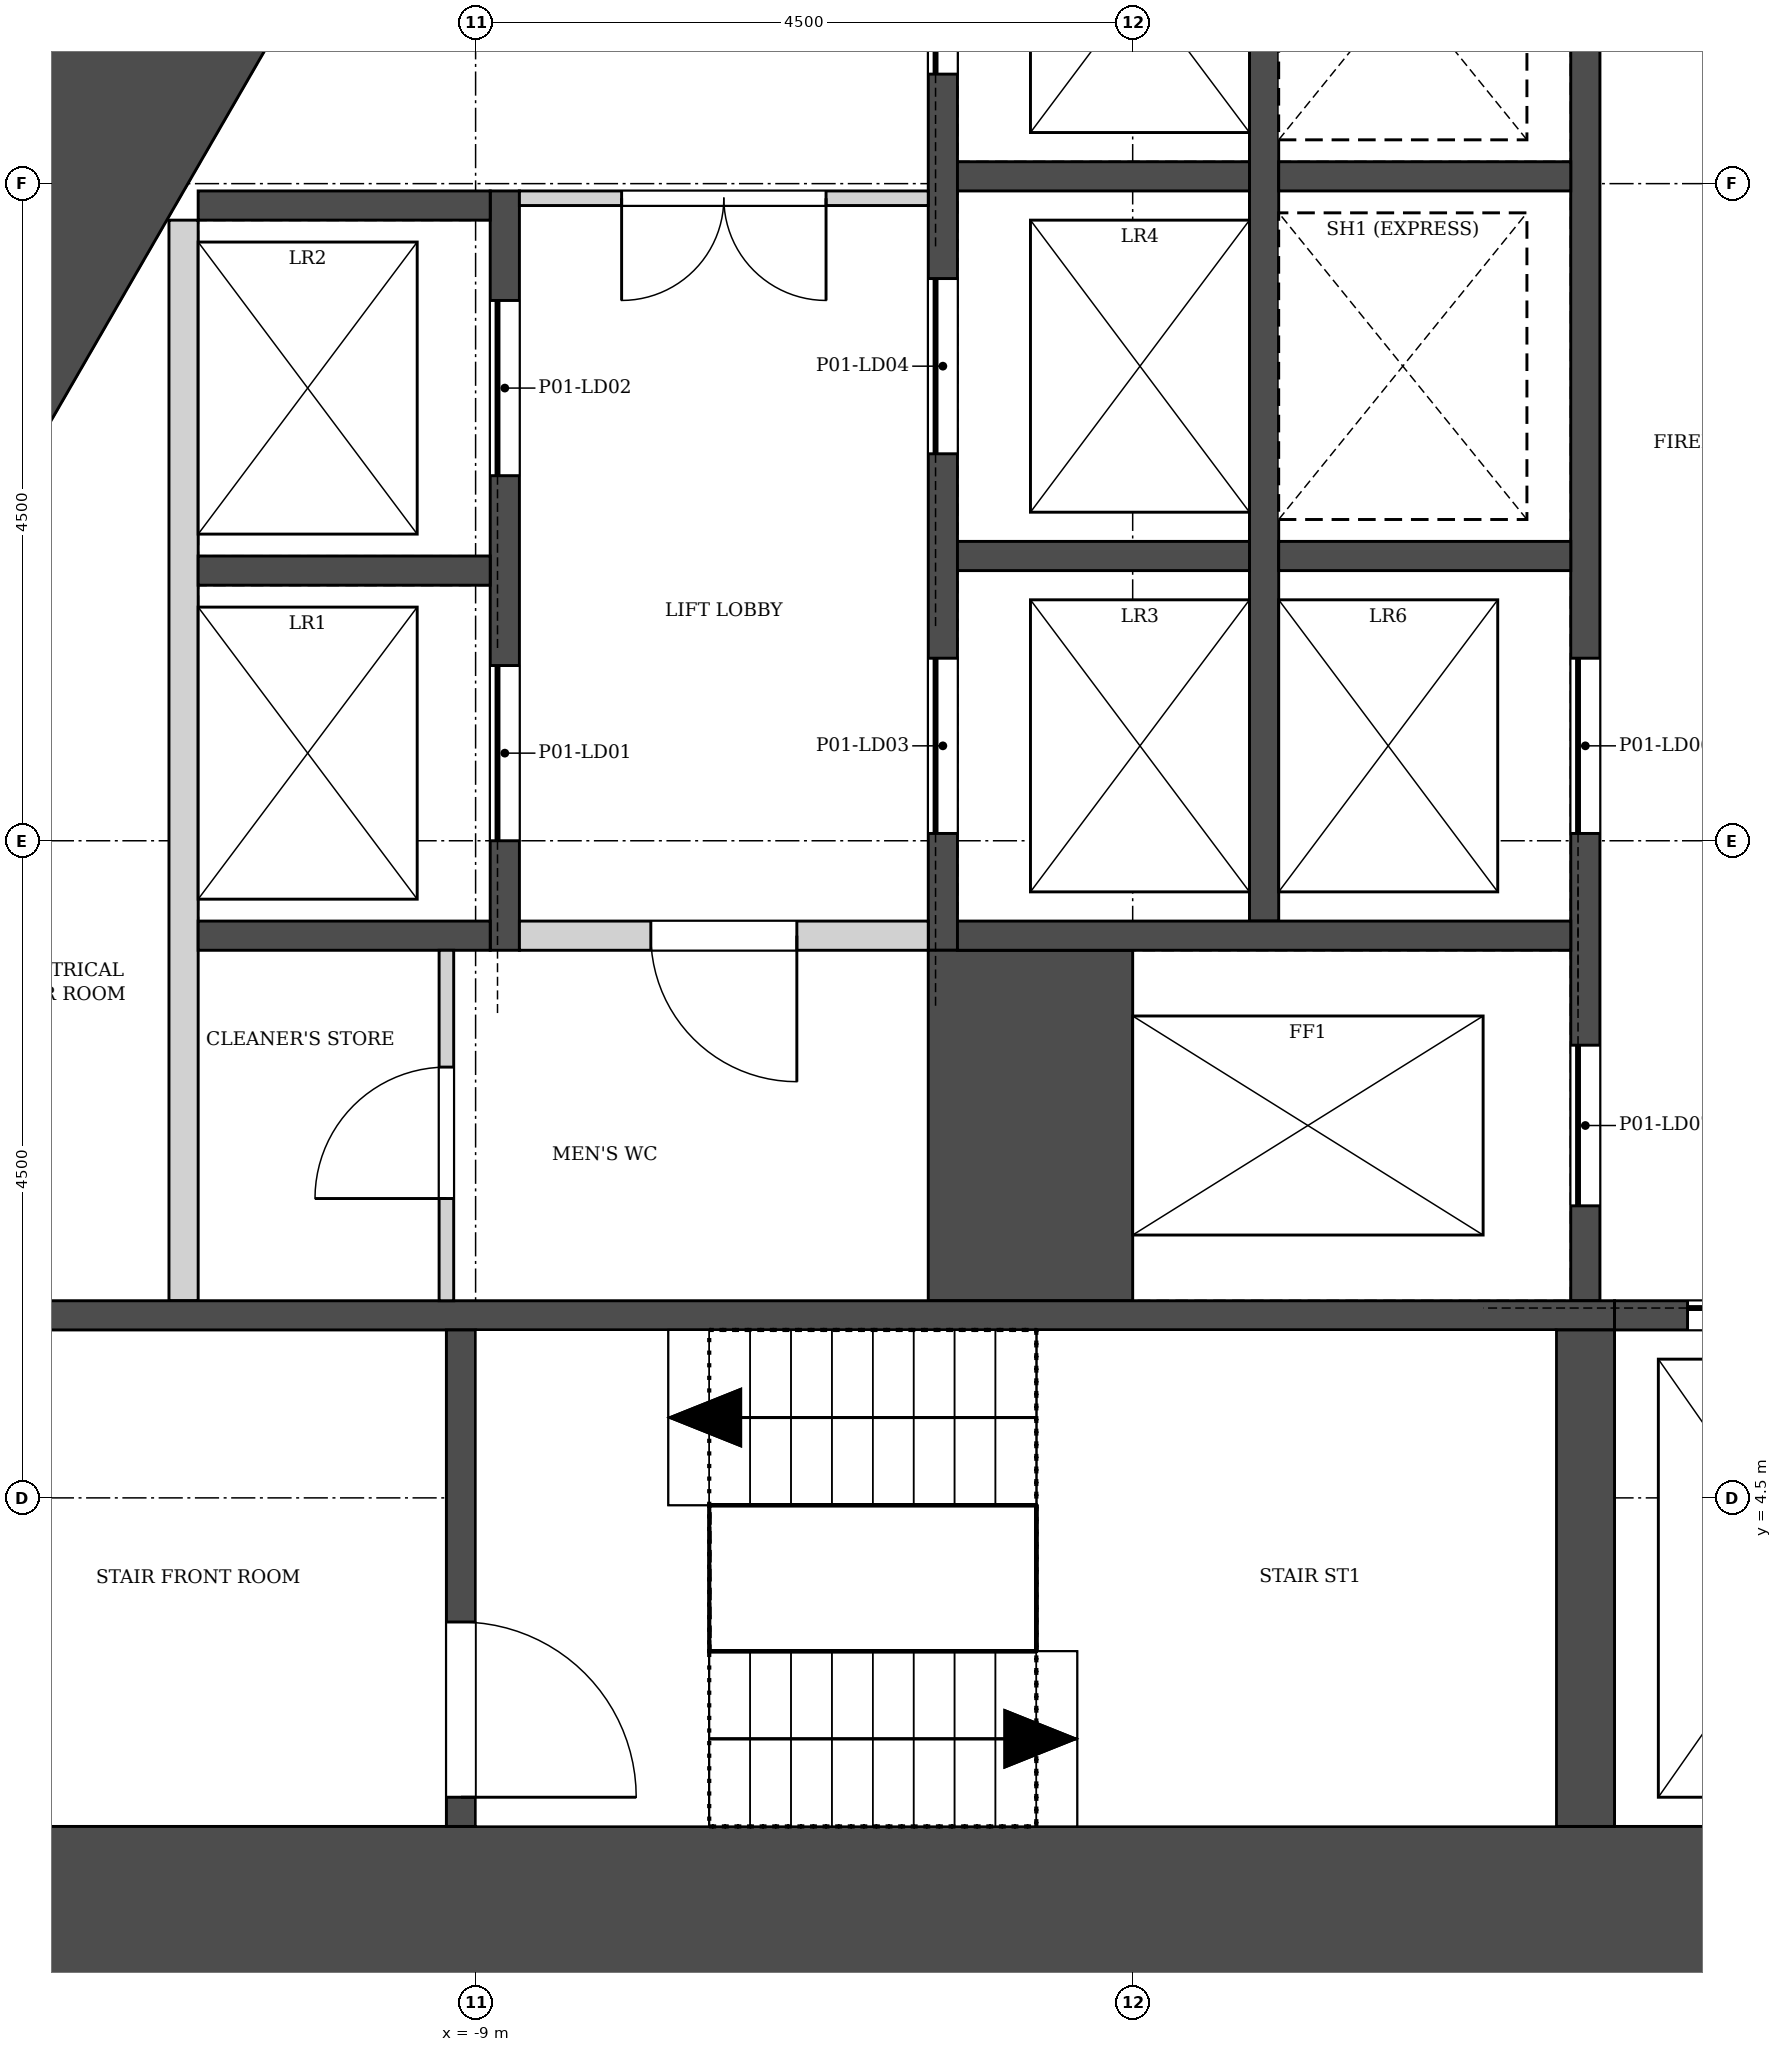
"""IFC4 building model, lengths in metres.
Left out: names, types, materials, properties, quantities, classifications, styles, units other than length and angle.
Written with IfcOpenShell. Run it as: python <this file> out.ifc"""

import sys

from ifc_helpers import new_model, si_unit, direction, frame, frame_2d, origin, place, context, subcontext, project, spatial, rectangle, extrude, element, fill, save


model = new_model("IFC4")
c1 = context("Model", 3, precision=1e-05, world=origin(), true_north=direction((0.0, 1.0)))
c2 = subcontext(c1, "Body", "Model", "MODEL_VIEW")
j1 = project(units=[si_unit("LENGTHUNIT", "METRE"), si_unit("PLANEANGLEUNIT", "RADIAN")], contexts=[c1])
p1 = place(None, origin())
s1 = spatial("IfcSite", under=j1, at=p1, CompositionType="ELEMENT")
p2 = place(p1, origin())
s2 = spatial("IfcBuilding", under=s1, at=p2, CompositionType="ELEMENT")
p3 = place(p2, frame((0.0, 0.0, 8.0)))
s3 = spatial("IfcBuildingStorey", under=s2, at=p3, CompositionType="ELEMENT", Elevation=8.0)
p4 = place(p3, frame((-14.0, 1.55, 0.0), z_axis=(0.0, 0.0, 1.0), x_axis=(1.0, 0.0, 0.0)))
e1 = element("IfcWall", 1, at=p4, inside=s3, PredefinedType="SHEAR", context=c2, shape_type="SweptSolid", body=[
    extrude(rectangle(XDim=28.0, YDim=1.4, at=frame_2d((14.0, 0.0))), origin(), (0.0, 0.0, 1.0), 6.0),
])
p5 = place(p3, frame((-8.805, 18.65, 0.0), z_axis=(0.0, 0.0, 1.0), x_axis=(-0.50000187635, -0.866024320471, 0.0)))
e2 = element("IfcWall", 2, at=p5, inside=s3, PredefinedType="SHEAR", context=c2, shape_type="SweptSolid", body=[
    extrude(rectangle(XDim=9.177, YDim=1.4, at=frame_2d((4.588, 0.0))), origin(), (0.0, 0.0, 1.0), 6.0),
])
p6 = place(p3, frame((-11.0, 5.85, 0.0), z_axis=(0.0, 0.0, 1.0), x_axis=(0.0, 1.0, 0.0)))
e3 = element("IfcWall", 3, at=p6, inside=s3, PredefinedType="SOLIDWALL", context=c2, shape_type="SweptSolid", body=[
    extrude(rectangle(XDim=7.4, YDim=0.2, at=frame_2d((3.7, 0.0))), origin(), (0.0, 0.0, 1.0), 5.7),
])
p7 = place(p3, frame((-8.8, 8.25, -0.3), z_axis=(0.0, 0.0, 1.0), x_axis=(0.0, 1.0, 0.0)))
e4 = element("IfcWall", 4, at=p7, inside=s3, PredefinedType="SOLIDWALL", context=c2, shape_type="SweptSolid", body=[
    extrude(rectangle(XDim=5.2, YDim=0.2, at=frame_2d((2.6, 0.0))), origin(), (0.0, 0.0, 1.0), 6.0),
])
p8 = place(p7, frame((0.75, 0.0, 0.3)))
e5 = element("IfcOpeningElement", 5, at=p8, cuts=e4, PredefinedType="OPENING", context=c2, shape_type="SweptSolid", body=[
    extrude(rectangle(XDim=1.2, YDim=2.1, at=frame_2d((0.6, 1.05))), frame((0.0, 0.11, 0.0), z_axis=(0.0, -1.0, 0.0), x_axis=(1.0, 0.0, 0.0)), (0.0, 0.0, 1.0), 0.22),
])
p9 = place(p7, frame((3.25, 0.0, 0.3)))
e6 = element("IfcOpeningElement", 6, at=p9, cuts=e4, PredefinedType="OPENING", context=c2, shape_type="SweptSolid", body=[
    extrude(rectangle(XDim=1.2, YDim=2.1, at=frame_2d((0.6, 1.05))), frame((0.0, 0.11, 0.0), z_axis=(0.0, -1.0, 0.0), x_axis=(1.0, 0.0, 0.0)), (0.0, 0.0, 1.0), 0.22),
])
p10 = place(p3, frame((-5.8, 8.25, -0.3), z_axis=(0.0, 0.0, 1.0), x_axis=(0.0, 1.0, 0.0)))
e7 = element("IfcWall", 7, at=p10, inside=s3, PredefinedType="SOLIDWALL", context=c2, shape_type="SweptSolid", body=[
    extrude(rectangle(XDim=8.0, YDim=0.2, at=frame_2d((4.0, 0.0))), origin(), (0.0, 0.0, 1.0), 6.0),
])
p11 = place(p10, frame((0.8, 0.0, 0.3)))
e8 = element("IfcOpeningElement", 8, at=p11, cuts=e7, PredefinedType="OPENING", context=c2, shape_type="SweptSolid", body=[
    extrude(rectangle(XDim=1.2, YDim=2.1, at=frame_2d((0.6, 1.05))), frame((0.0, 0.11, 0.0), z_axis=(0.0, -1.0, 0.0), x_axis=(1.0, 0.0, 0.0)), (0.0, 0.0, 1.0), 0.22),
])
p12 = place(p10, frame((3.4, 0.0, 0.3)))
e9 = element("IfcOpeningElement", 9, at=p12, cuts=e7, PredefinedType="OPENING", context=c2, shape_type="SweptSolid", body=[
    extrude(rectangle(XDim=1.2, YDim=2.1, at=frame_2d((0.6, 1.05))), frame((0.0, 0.11, 0.0), z_axis=(0.0, -1.0, 0.0), x_axis=(1.0, 0.0, 0.0)), (0.0, 0.0, 1.0), 0.22),
])
p13 = place(p10, frame((6.0, 0.0, 0.3)))
e10 = element("IfcOpeningElement", 10, at=p13, cuts=e7, PredefinedType="OPENING", context=c2, shape_type="SweptSolid", body=[
    extrude(rectangle(XDim=1.2, YDim=2.1, at=frame_2d((0.6, 1.05))), frame((0.0, 0.11, 0.0), z_axis=(0.0, -1.0, 0.0), x_axis=(1.0, 0.0, 0.0)), (0.0, 0.0, 1.0), 0.22),
])
p14 = place(p3, frame((-3.6, 8.45, -0.3), z_axis=(0.0, 0.0, 1.0), x_axis=(0.0, 1.0, 0.0)))
e11 = element("IfcWall", 11, at=p14, inside=s3, PredefinedType="SOLIDWALL", context=c2, shape_type="SweptSolid", body=[
    extrude(rectangle(XDim=7.8, YDim=0.2, at=frame_2d((3.9, 0.0))), origin(), (0.0, 0.0, 1.0), 6.0),
])
p15 = place(p3, frame((-1.4, 5.85, -0.3), z_axis=(0.0, 0.0, 1.0), x_axis=(0.0, 1.0, 0.0)))
e12 = element("IfcWall", 12, at=p15, inside=s3, PredefinedType="SOLIDWALL", context=c2, shape_type="SweptSolid", body=[
    extrude(rectangle(XDim=11.75, YDim=0.2, at=frame_2d((5.875, 0.0))), origin(), (0.0, 0.0, 1.0), 6.0),
])
p16 = place(p15, frame((3.2, 0.0, 0.3)))
e13 = element("IfcOpeningElement", 13, at=p16, cuts=e12, PredefinedType="OPENING", context=c2, shape_type="SweptSolid", body=[
    extrude(rectangle(XDim=1.2, YDim=2.1, at=frame_2d((0.6, 1.05))), frame((0.0, 0.11, 0.0), z_axis=(0.0, -1.0, 0.0), x_axis=(1.0, 0.0, 0.0)), (0.0, 0.0, 1.0), 0.22),
])
p17 = place(p15, frame((0.65, 0.0, 0.3)))
e14 = element("IfcOpeningElement", 14, at=p17, cuts=e12, PredefinedType="OPENING", context=c2, shape_type="SweptSolid", body=[
    extrude(rectangle(XDim=1.1, YDim=2.1, at=frame_2d((0.55, 1.05))), frame((0.0, 0.11, 0.0), z_axis=(0.0, -1.0, 0.0), x_axis=(1.0, 0.0, 0.0)), (0.0, 0.0, 1.0), 0.22),
])
p18 = place(p3, frame((-5.2, 5.85, -0.3), z_axis=(0.0, 0.0, 1.0), x_axis=(0.0, 1.0, 0.0)))
e15 = element("IfcWall", 15, at=p18, inside=s3, PredefinedType="SOLIDWALL", context=c2, shape_type="SweptSolid", body=[
    extrude(rectangle(XDim=2.4, YDim=1.4, at=frame_2d((1.2, 0.0))), origin(), (0.0, 0.0, 1.0), 6.0),
])
p19 = place(p3, frame((-10.9, 8.35, -0.3), z_axis=(0.0, 0.0, 1.0), x_axis=(1.0, 0.0, 0.0)))
e16 = element("IfcWall", 16, at=p19, inside=s3, PredefinedType="SOLIDWALL", context=c2, shape_type="SweptSolid", body=[
    extrude(rectangle(XDim=2.0, YDim=0.2, at=frame_2d((1.0, 0.0))), origin(), (0.0, 0.0, 1.0), 6.0),
])
p20 = place(p3, frame((-5.7, 8.35, -0.3), z_axis=(0.0, 0.0, 1.0), x_axis=(1.0, 0.0, 0.0)))
e17 = element("IfcWall", 17, at=p20, inside=s3, PredefinedType="SOLIDWALL", context=c2, shape_type="SweptSolid", body=[
    extrude(rectangle(XDim=4.2, YDim=0.2, at=frame_2d((2.1, 0.0))), origin(), (0.0, 0.0, 1.0), 6.0),
])
p21 = place(p3, frame((-12.6, 5.75, -0.3), z_axis=(0.0, 0.0, 1.0), x_axis=(1.0, 0.0, 0.0)))
e18 = element("IfcWall", 18, at=p21, inside=s3, PredefinedType="SOLIDWALL", context=c2, shape_type="SweptSolid", body=[
    extrude(rectangle(XDim=11.4, YDim=0.2, at=frame_2d((5.7, 0.0))), origin(), (0.0, 0.0, 1.0), 6.0),
])
p22 = place(p3, frame((-1.2, 5.75, -0.3), z_axis=(0.0, 0.0, 1.0), x_axis=(1.0, 0.0, 0.0)))
e19 = element("IfcWall", 19, at=p22, inside=s3, PredefinedType="SOLIDWALL", context=c2, shape_type="SweptSolid", body=[
    extrude(rectangle(XDim=2.4, YDim=0.2, at=frame_2d((1.2, 0.0))), origin(), (0.0, 0.0, 1.0), 6.0),
])
p23 = place(p22, frame((0.5, 0.0, 0.3)))
e20 = element("IfcOpeningElement", 20, at=p23, cuts=e19, PredefinedType="OPENING", context=c2, shape_type="SweptSolid", body=[
    extrude(rectangle(XDim=1.4, YDim=2.1, at=frame_2d((0.7, 1.05))), frame((0.0, 0.11, 0.0), z_axis=(0.0, -1.0, 0.0), x_axis=(1.0, 0.0, 0.0)), (0.0, 0.0, 1.0), 0.22),
])
p24 = place(p3, frame((-9.1, 2.25, -0.3), z_axis=(0.0, 0.0, 1.0), x_axis=(0.0, 1.0, 0.0)))
e21 = element("IfcWall", 21, at=p24, inside=s3, PredefinedType="SOLIDWALL", context=c2, shape_type="SweptSolid", body=[
    extrude(rectangle(XDim=3.4, YDim=0.2, at=frame_2d((1.7, 0.0))), origin(), (0.0, 0.0, 1.0), 6.0),
])
p25 = place(p24, frame((0.2, 0.0, 0.3)))
e22 = element("IfcOpeningElement", 22, at=p25, cuts=e21, PredefinedType="OPENING", context=c2, shape_type="SweptSolid", body=[
    extrude(rectangle(XDim=1.2, YDim=2.1, at=frame_2d((0.6, 1.05))), frame((0.0, 0.11, 0.0), z_axis=(0.0, -1.0, 0.0), x_axis=(1.0, 0.0, 0.0)), (0.0, 0.0, 1.0), 0.22),
])
p26 = place(p3, frame((-1.4, 2.25, -0.3), z_axis=(0.0, 0.0, 1.0), x_axis=(0.0, 1.0, 0.0)))
e23 = element("IfcWall", 23, at=p26, inside=s3, PredefinedType="SOLIDWALL", context=c2, shape_type="SweptSolid", body=[
    extrude(rectangle(XDim=3.4, YDim=0.4, at=frame_2d((1.7, 0.0))), origin(), (0.0, 0.0, 1.0), 6.0),
])
for number, where, z_axis, x_axis in (
    (24, (-10.9, 10.85, -0.3), (0.0, 0.0, 1.0), (1.0, 0.0, 0.0)),
    (25, (-10.9, 13.35, -0.3), (0.0, 0.0, 1.0), (1.0, 0.0, 0.0)),
    (26, (-5.7, 10.95, -0.3), (0.0, 0.0, 1.0), (1.0, 0.0, 0.0)),
    (27, (-5.7, 13.55, -0.3), (0.0, 0.0, 1.0), (1.0, 0.0, 0.0)),
    (28, (-3.5, 10.95, -0.3), (0.0, 0.0, 1.0), (1.0, 0.0, 0.0)),
    (29, (-3.5, 13.55, -0.3), (0.0, 0.0, 1.0), (1.0, 0.0, 0.0)),
):
    element("IfcWall", number, at=place(p3, frame(where, z_axis=z_axis, x_axis=x_axis)), inside=s3, PredefinedType="SOLIDWALL", context=c2, shape_type="SweptSolid", body=[
        extrude(rectangle(XDim=2.0, YDim=0.2, at=frame_2d((1.0, 0.0))), origin(), (0.0, 0.0, 1.0), 6.0),
    ])
p27 = place(p3, frame((-8.7, 13.4, 0.0), z_axis=(0.0, 0.0, 1.0), x_axis=(1.0, 0.0, 0.0)))
e30 = element("IfcWall", 30, at=p27, inside=s3, PredefinedType="PARTITIONING", context=c2, shape_type="SweptSolid", body=[
    extrude(rectangle(XDim=2.8, YDim=0.1, at=frame_2d((1.4, 0.0))), origin(), (0.0, 0.0, 1.0), 5.7),
])
p28 = place(p27, frame((0.7, 0.0, 0.0)))
e31 = element("IfcOpeningElement", 31, at=p28, cuts=e30, PredefinedType="OPENING", context=c2, shape_type="SweptSolid", body=[
    extrude(rectangle(XDim=1.4, YDim=2.1, at=frame_2d((0.7, 1.05))), frame((0.0, 0.06, 0.0), z_axis=(0.0, -1.0, 0.0), x_axis=(1.0, 0.0, 0.0)), (0.0, 0.0, 1.0), 0.12),
])
p29 = place(p3, frame((-9.2, 5.85, 0.0), z_axis=(0.0, 0.0, 1.0), x_axis=(0.0, 1.0, 0.0)))
e32 = element("IfcWall", 32, at=p29, inside=s3, PredefinedType="PARTITIONING", context=c2, shape_type="SweptSolid", body=[
    extrude(rectangle(XDim=2.4, YDim=0.1, at=frame_2d((1.2, 0.0))), origin(), (0.0, 0.0, 1.0), 5.7),
])
p30 = place(p29, frame((0.7, 0.0, 0.0)))
e33 = element("IfcOpeningElement", 33, at=p30, cuts=e32, PredefinedType="OPENING", context=c2, shape_type="SweptSolid", body=[
    extrude(rectangle(XDim=0.9, YDim=2.1, at=frame_2d((0.45, 1.05))), frame((0.0, 0.06, 0.0), z_axis=(0.0, -1.0, 0.0), x_axis=(1.0, 0.0, 0.0)), (0.0, 0.0, 1.0), 0.12),
])
p31 = place(p3, frame((-8.7, 8.35, 0.0), z_axis=(0.0, 0.0, 1.0), x_axis=(1.0, 0.0, 0.0)))
e34 = element("IfcWall", 34, at=p31, inside=s3, PredefinedType="SOLIDWALL", context=c2, shape_type="SweptSolid", body=[
    extrude(rectangle(XDim=2.8, YDim=0.2, at=frame_2d((1.4, 0.0))), origin(), (0.0, 0.0, 1.0), 5.7),
])
p32 = place(p31, frame((0.9, 0.0, 0.0)))
e35 = element("IfcOpeningElement", 35, at=p32, cuts=e34, PredefinedType="OPENING", context=c2, shape_type="SweptSolid", body=[
    extrude(rectangle(XDim=1.0, YDim=2.1, at=frame_2d((0.5, 1.05))), frame((0.0, 0.11, 0.0), z_axis=(0.0, -1.0, 0.0), x_axis=(1.0, 0.0, 0.0)), (0.0, 0.0, 1.0), 0.22),
])
p33 = place(p8, origin())
e36 = element("IfcDoor", 36, at=p33, inside=s3, OperationType="SLIDING_TO_LEFT", PredefinedType="DOOR", context=c2, shape_type="SweptSolid", body=[
    extrude(rectangle(XDim=1.2, YDim=2.1, at=frame_2d((0.6, 1.05))), frame((0.0, 0.025, 0.0), z_axis=(0.0, -1.0, 0.0), x_axis=(1.0, 0.0, 0.0)), (0.0, 0.0, 1.0), 0.05),
])
fill(e5, e36)
p34 = place(p9, origin())
e37 = element("IfcDoor", 37, at=p34, inside=s3, OperationType="SLIDING_TO_LEFT", PredefinedType="DOOR", context=c2, shape_type="SweptSolid", body=[
    extrude(rectangle(XDim=1.2, YDim=2.1, at=frame_2d((0.6, 1.05))), frame((0.0, 0.025, 0.0), z_axis=(0.0, -1.0, 0.0), x_axis=(1.0, 0.0, 0.0)), (0.0, 0.0, 1.0), 0.05),
])
fill(e6, e37)
p35 = place(p11, origin())
e38 = element("IfcDoor", 38, at=p35, inside=s3, OperationType="SLIDING_TO_LEFT", PredefinedType="DOOR", context=c2, shape_type="SweptSolid", body=[
    extrude(rectangle(XDim=1.2, YDim=2.1, at=frame_2d((0.6, 1.05))), frame((0.0, 0.025, 0.0), z_axis=(0.0, -1.0, 0.0), x_axis=(1.0, 0.0, 0.0)), (0.0, 0.0, 1.0), 0.05),
])
fill(e8, e38)
p36 = place(p12, origin())
e39 = element("IfcDoor", 39, at=p36, inside=s3, OperationType="SLIDING_TO_LEFT", PredefinedType="DOOR", context=c2, shape_type="SweptSolid", body=[
    extrude(rectangle(XDim=1.2, YDim=2.1, at=frame_2d((0.6, 1.05))), frame((0.0, 0.025, 0.0), z_axis=(0.0, -1.0, 0.0), x_axis=(1.0, 0.0, 0.0)), (0.0, 0.0, 1.0), 0.05),
])
fill(e9, e39)
p37 = place(p13, origin())
e40 = element("IfcDoor", 40, at=p37, inside=s3, OperationType="SLIDING_TO_LEFT", PredefinedType="DOOR", context=c2, shape_type="SweptSolid", body=[
    extrude(rectangle(XDim=1.2, YDim=2.1, at=frame_2d((0.6, 1.05))), frame((0.0, 0.025, 0.0), z_axis=(0.0, -1.0, 0.0), x_axis=(1.0, 0.0, 0.0)), (0.0, 0.0, 1.0), 0.05),
])
fill(e10, e40)
p38 = place(p16, origin())
e41 = element("IfcDoor", 41, at=p38, inside=s3, OperationType="SLIDING_TO_LEFT", PredefinedType="DOOR", context=c2, shape_type="SweptSolid", body=[
    extrude(rectangle(XDim=1.2, YDim=2.1, at=frame_2d((0.6, 1.05))), frame((0.0, 0.025, 0.0), z_axis=(0.0, -1.0, 0.0), x_axis=(1.0, 0.0, 0.0)), (0.0, 0.0, 1.0), 0.05),
])
fill(e13, e41)
p39 = place(p17, origin())
e42 = element("IfcDoor", 42, at=p39, inside=s3, OperationType="SLIDING_TO_RIGHT", PredefinedType="DOOR", context=c2, shape_type="SweptSolid", body=[
    extrude(rectangle(XDim=1.1, YDim=2.1, at=frame_2d((0.55, 1.05))), frame((0.0, 0.025, 0.0), z_axis=(0.0, -1.0, 0.0), x_axis=(1.0, 0.0, 0.0)), (0.0, 0.0, 1.0), 0.05),
])
fill(e14, e42)
p40 = place(p23, origin())
e43 = element("IfcDoor", 43, at=p40, inside=s3, OperationType="SLIDING_TO_LEFT", PredefinedType="DOOR", context=c2, shape_type="SweptSolid", body=[
    extrude(rectangle(XDim=1.4, YDim=2.1, at=frame_2d((0.7, 1.05))), frame((0.0, 0.025, 0.0), z_axis=(0.0, -1.0, 0.0), x_axis=(1.0, 0.0, 0.0)), (0.0, 0.0, 1.0), 0.05),
])
fill(e20, e43)
p41 = place(p28, frame((1.4, 0.0, 0.0), z_axis=(0.0, 0.0, 1.0), x_axis=(-1.0, 0.0, 0.0)))
e44 = element("IfcDoor", 44, at=p41, inside=s3, OperationType="DOUBLE_DOOR_SINGLE_SWING", PredefinedType="DOOR", context=c2, shape_type="SweptSolid", body=[
    extrude(rectangle(XDim=1.4, YDim=2.1, at=frame_2d((0.7, 1.05))), frame((0.0, 0.025, 0.0), z_axis=(0.0, -1.0, 0.0), x_axis=(1.0, 0.0, 0.0)), (0.0, 0.0, 1.0), 0.05),
])
fill(e31, e44)
p42 = place(p32, frame((1.0, 0.0, 0.0), z_axis=(0.0, 0.0, 1.0), x_axis=(-1.0, 0.0, 0.0)))
e45 = element("IfcDoor", 45, at=p42, inside=s3, OperationType="SINGLE_SWING_LEFT", PredefinedType="DOOR", context=c2, shape_type="SweptSolid", body=[
    extrude(rectangle(XDim=1.0, YDim=2.1, at=frame_2d((0.5, 1.05))), frame((0.0, 0.025, 0.0), z_axis=(0.0, -1.0, 0.0), x_axis=(1.0, 0.0, 0.0)), (0.0, 0.0, 1.0), 0.05),
])
fill(e35, e45)
p43 = place(p30, origin())
e46 = element("IfcDoor", 46, at=p43, inside=s3, OperationType="SINGLE_SWING_LEFT", PredefinedType="DOOR", context=c2, shape_type="SweptSolid", body=[
    extrude(rectangle(XDim=0.9, YDim=2.1, at=frame_2d((0.45, 1.05))), frame((0.0, 0.025, 0.0), z_axis=(0.0, -1.0, 0.0), x_axis=(1.0, 0.0, 0.0)), (0.0, 0.0, 1.0), 0.05),
])
fill(e33, e46)
p44 = place(p25, frame((1.2, 0.0, 0.0), z_axis=(0.0, 0.0, 1.0), x_axis=(-1.0, 0.0, 0.0)))
e47 = element("IfcDoor", 47, at=p44, inside=s3, OperationType="SINGLE_SWING_RIGHT", PredefinedType="DOOR", context=c2, shape_type="SweptSolid", body=[
    extrude(rectangle(XDim=1.2, YDim=2.1, at=frame_2d((0.6, 1.05))), frame((0.0, 0.025, 0.0), z_axis=(0.0, -1.0, 0.0), x_axis=(1.0, 0.0, 0.0)), (0.0, 0.0, 1.0), 0.05),
])
fill(e22, e47)
save(model, sys.argv[1])
